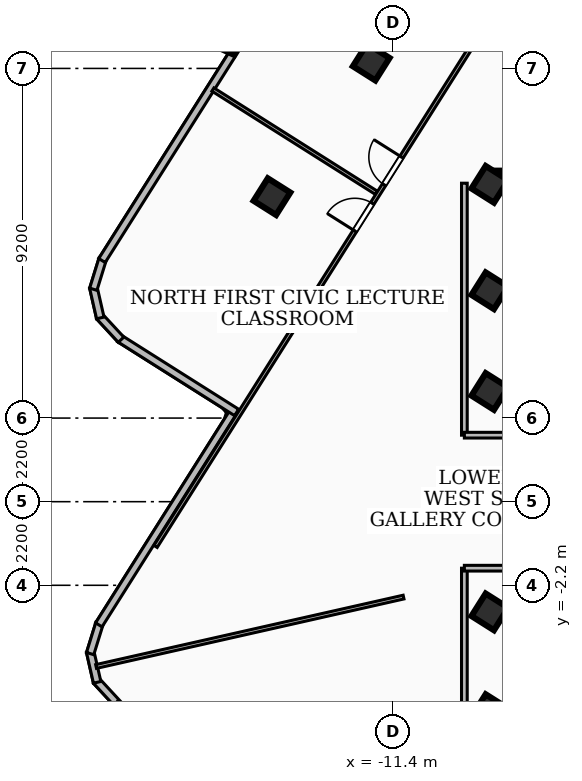
"""IFC4 building model, lengths in metres.
Left out: names, types, materials, properties, quantities, classifications, styles, units other than length and angle.
Written with IfcOpenShell. Run it as: python <this file> out.ifc"""

import sys

from ifc_helpers import new_model, si_unit, direction, frame, frame_2d, origin, origin_2d, place, context, subcontext, project, spatial, rectangle, extrude, element, fill, save


model = new_model("IFC4")
c1 = context("Model", 3, precision=1e-05, world=origin(), true_north=direction((0.0, 1.0)))
c2 = subcontext(c1, "Body", "Model", "MODEL_VIEW")
j1 = project(units=[si_unit("LENGTHUNIT", "METRE"), si_unit("PLANEANGLEUNIT", "RADIAN")], contexts=[c1])
p1 = place(None, origin())
s1 = spatial("IfcSite", under=j1, at=p1, CompositionType="ELEMENT")
p2 = place(p1, origin())
s2 = spatial("IfcBuilding", under=s1, at=p2, CompositionType="ELEMENT")
p3 = place(p2, frame((0.0, 0.0, 271.44)))
s3 = spatial("IfcBuildingStorey", under=s2, at=p3, CompositionType="ELEMENT", Elevation=271.44)
p4 = place(p3, frame((-8.78, 8.51, 0.0), z_axis=(0.0, 0.0, 1.0), x_axis=(1.0, 0.0, 0.0)))
e1 = element("IfcWall", 1, at=p4, inside=s3, PredefinedType="SHEAR", context=c2, shape_type="SweptSolid", body=[
    extrude(rectangle(XDim=17.56, YDim=0.4, at=frame_2d((8.78, 0.0))), origin(), (0.0, 0.0, 1.0), 3.16),
])
for number, where, z_axis, x_axis in (
    (2, (-8.85, -5.55, 0.0), (0.0, 0.0, 1.0), (0.534, 0.845, 0.0)),
    (3, (-8.85, -2.9, 0.0), (0.0, 0.0, 1.0), (0.534, 0.845, 0.0)),
    (4, (-8.85, 2.9, 0.0), (0.0, 0.0, 1.0), (0.534, 0.845, 0.0)),
    (5, (-8.85, 5.55, 0.0), (0.0, 0.0, 1.0), (0.534, 0.845, 0.0)),
    (6, (-8.85, 8.35, 0.0), (0.0, 0.0, 1.0), (0.534, 0.845, 0.0)),
    (7, (-11.971, 11.566, 0.0), (0.0, 0.0, 1.0), (0.534, 0.845, 0.0)),
    (8, (-14.583, 8.026, 0.0), (0.0, 0.0, 1.0), (0.534, 0.845, 0.0)),
):
    element("IfcColumn", number, at=place(p3, frame(where, z_axis=z_axis, x_axis=x_axis)), inside=s3, PredefinedType="COLUMN", context=c2, shape_type="SweptSolid", body=[
        extrude(rectangle(XDim=0.7, YDim=0.7, at=origin_2d()), origin(), (0.0, 0.0, 1.0), 3.42),
    ])
p5 = place(p3, frame((-18.638, -5.326, 0.0), z_axis=(0.0, 0.0, 1.0), x_axis=(-0.678558613405, 0.734546260064, 0.0)))
e9 = element("IfcWall", 9, at=p5, inside=s3, PredefinedType="SOLIDWALL", context=c2, shape_type="SweptSolid", body=[
    extrude(rectangle(XDim=0.837, YDim=0.2, at=frame_2d((0.418, 0.0))), origin(), (0.0, 0.0, 1.0), 3.16),
])
p6 = place(p3, frame((-19.183, -4.753, 0.0), z_axis=(0.0, 0.0, 1.0), x_axis=(-0.22178748126, 0.975095027757, 0.0)))
e10 = element("IfcWall", 10, at=p6, inside=s3, PredefinedType="SOLIDWALL", context=c2, shape_type="SweptSolid", body=[
    extrude(rectangle(XDim=0.824, YDim=0.2, at=frame_2d((0.412, 0.0))), origin(), (0.0, 0.0, 1.0), 3.16),
])
p7 = place(p3, frame((-19.367, -3.997, 0.0), z_axis=(0.0, 0.0, 1.0), x_axis=(0.295803919306, 0.955248680357, 0.0)))
e11 = element("IfcWall", 11, at=p7, inside=s3, PredefinedType="SOLIDWALL", context=c2, shape_type="SweptSolid", body=[
    extrude(rectangle(XDim=0.839, YDim=0.2, at=frame_2d((0.419, 0.0))), origin(), (0.0, 0.0, 1.0), 3.16),
])
p8 = place(p3, frame((-19.139, -3.241, 0.0), z_axis=(0.0, 0.0, 1.0), x_axis=(0.534084270085, 0.845431246435, 0.0)))
e12 = element("IfcWall", 12, at=p8, inside=s3, PredefinedType="SOLIDWALL", context=c2, shape_type="SweptSolid", body=[
    extrude(rectangle(XDim=6.742, YDim=0.2, at=frame_2d((3.371, 0.0))), origin(), (0.0, 0.0, 1.0), 3.16),
])
p9 = place(p3, frame((-15.513, 2.348, 0.0), z_axis=(0.0, 0.0, 1.0), x_axis=(-0.8454427056, 0.534066130313, 0.0)))
e13 = element("IfcWall", 13, at=p9, inside=s3, PredefinedType="SOLIDWALL", context=c2, shape_type="SweptSolid", body=[
    extrude(rectangle(XDim=3.642, YDim=0.2, at=frame_2d((1.821, 0.0))), origin(), (0.0, 0.0, 1.0), 3.16),
])
p10 = place(p3, frame((-18.554, 4.262, 0.0), z_axis=(0.0, 0.0, 1.0), x_axis=(-0.679187212508, 0.73396507435, 0.0)))
e14 = element("IfcWall", 14, at=p10, inside=s3, PredefinedType="SOLIDWALL", context=c2, shape_type="SweptSolid", body=[
    extrude(rectangle(XDim=0.838, YDim=0.2, at=frame_2d((0.419, 0.0))), origin(), (0.0, 0.0, 1.0), 3.16),
])
p11 = place(p3, frame((-19.1, 4.835, 0.0), z_axis=(0.0, 0.0, 1.0), x_axis=(-0.222043922605, 0.975036664149, 0.0)))
e15 = element("IfcWall", 15, at=p11, inside=s3, PredefinedType="SOLIDWALL", context=c2, shape_type="SweptSolid", body=[
    extrude(rectangle(XDim=0.823, YDim=0.2, at=frame_2d((0.412, 0.0))), origin(), (0.0, 0.0, 1.0), 3.16),
])
p12 = place(p3, frame((-19.284, 5.59, 0.0), z_axis=(0.0, 0.0, 1.0), x_axis=(0.295803919306, 0.955248680357, 0.0)))
e16 = element("IfcWall", 16, at=p12, inside=s3, PredefinedType="SOLIDWALL", context=c2, shape_type="SweptSolid", body=[
    extrude(rectangle(XDim=0.839, YDim=0.2, at=frame_2d((0.419, 0.0))), origin(), (0.0, 0.0, 1.0), 3.16),
])
p13 = place(p3, frame((-19.056, 6.346, 0.0), z_axis=(0.0, 0.0, 1.0), x_axis=(0.534060804588, 0.845446069837, 0.0)))
e17 = element("IfcWall", 17, at=p13, inside=s3, PredefinedType="SOLIDWALL", context=c2, shape_type="SweptSolid", body=[
    extrude(rectangle(XDim=10.023, YDim=0.2, at=frame_2d((5.012, 0.0))), origin(), (0.0, 0.0, 1.0), 3.16),
])
p14 = place(p13, frame((6.618, 0.0, 0.85)))
e18 = element("IfcOpeningElement", 18, at=p14, cuts=e17, PredefinedType="OPENING", context=c2, shape_type="SweptSolid", body=[
    extrude(rectangle(XDim=2.4, YDim=1.85, at=frame_2d((1.2, 0.925))), frame((0.0, 0.11, 0.0), z_axis=(0.0, -1.0, 0.0), x_axis=(1.0, 0.0, 0.0)), (0.0, 0.0, 1.0), 0.22),
])
p15 = place(p3, frame((-9.52, 1.75, 0.0), z_axis=(0.0, 0.0, 1.0), x_axis=(0.0, 1.0, 0.0)))
e19 = element("IfcWall", 19, at=p15, inside=s3, PredefinedType="PARTITIONING", context=c2, shape_type="SweptSolid", body=[
    extrude(rectangle(XDim=6.63, YDim=0.15, at=frame_2d((3.315, 0.0))), origin(), (0.0, 0.0, 1.0), 2.53),
])
p16 = place(p3, frame((-7.85, 1.75, 0.0), z_axis=(0.0, 0.0, 1.0), x_axis=(-1.0, 0.0, 0.0)))
e20 = element("IfcWall", 20, at=p16, inside=s3, PredefinedType="PARTITIONING", context=c2, shape_type="SweptSolid", body=[
    extrude(rectangle(XDim=1.67, YDim=0.15, at=frame_2d((0.835, 0.0))), origin(), (0.0, 0.0, 1.0), 2.39),
])
p17 = place(p3, frame((-9.52, -8.38, 0.0), z_axis=(0.0, 0.0, 1.0), x_axis=(0.0, 1.0, 0.0)))
e21 = element("IfcWall", 21, at=p17, inside=s3, PredefinedType="PARTITIONING", context=c2, shape_type="SweptSolid", body=[
    extrude(rectangle(XDim=6.63, YDim=0.15, at=frame_2d((3.315, 0.0))), origin(), (0.0, 0.0, 1.0), 3.16),
])
p18 = place(p3, frame((-7.85, -1.75, 0.0), z_axis=(0.0, 0.0, 1.0), x_axis=(-1.0, 0.0, 0.0)))
e22 = element("IfcWall", 22, at=p18, inside=s3, PredefinedType="PARTITIONING", context=c2, shape_type="SweptSolid", body=[
    extrude(rectangle(XDim=1.67, YDim=0.15, at=frame_2d((0.835, 0.0))), origin(), (0.0, 0.0, 1.0), 2.39),
])
p19 = place(p3, frame((-11.12, -2.51, 0.0), z_axis=(0.0, 0.0, 1.0), x_axis=(-0.975442430033, -0.220254547494, 0.0)))
e23 = element("IfcWall", 23, at=p19, inside=s3, PredefinedType="PARTITIONING", context=c2, shape_type="SweptSolid", body=[
    extrude(rectangle(XDim=8.294, YDim=0.1, at=frame_2d((4.147, 0.0))), origin(), (0.0, 0.0, 1.0), 3.16),
])
p20 = place(p3, frame((-11.838, 8.129, 0.0), z_axis=(0.0, 0.0, 1.0), x_axis=(-0.845412458252, 0.53411400977, 0.0)))
e24 = element("IfcWall", 24, at=p20, inside=s3, PredefinedType="PARTITIONING", context=c2, shape_type="SweptSolid", body=[
    extrude(rectangle(XDim=5.085, YDim=0.1, at=frame_2d((2.542, 0.0))), origin(), (0.0, 0.0, 1.0), 2.53),
])
p21 = place(p3, frame((-17.646, -1.178, 0.0), z_axis=(0.0, 0.0, 1.0), x_axis=(0.534052309352, 0.845451436143, 0.0)))
e25 = element("IfcWall", 25, at=p21, inside=s3, PredefinedType="PARTITIONING", context=c2, shape_type="SweptSolid", body=[
    extrude(rectangle(XDim=20.44, YDim=0.1, at=frame_2d((10.22, 0.0))), origin(), (0.0, 0.0, 1.0), 2.53),
])
p22 = place(p21, frame((11.259, 0.0, 0.0)))
e26 = element("IfcOpeningElement", 26, at=p22, cuts=e25, PredefinedType="OPENING", context=c2, shape_type="SweptSolid", body=[
    extrude(rectangle(XDim=0.86, YDim=2.04, at=frame_2d((0.43, 1.02))), frame((0.0, 0.06, 0.0), z_axis=(0.0, -1.0, 0.0), x_axis=(1.0, 0.0, 0.0)), (0.0, 0.0, 1.0), 0.12),
])
p23 = place(p21, frame((9.819, 0.0, 0.0)))
e27 = element("IfcOpeningElement", 27, at=p23, cuts=e25, PredefinedType="OPENING", context=c2, shape_type="SweptSolid", body=[
    extrude(rectangle(XDim=0.86, YDim=2.04, at=frame_2d((0.43, 1.02))), frame((0.0, 0.06, 0.0), z_axis=(0.0, -1.0, 0.0), x_axis=(1.0, 0.0, 0.0)), (0.0, 0.0, 1.0), 0.12),
])
p24 = place(p22, origin())
e28 = element("IfcDoor", 28, at=p24, inside=s3, OperationType="SINGLE_SWING_RIGHT", PredefinedType="DOOR", context=c2, shape_type="SweptSolid", body=[
    extrude(rectangle(XDim=0.86, YDim=2.04, at=frame_2d((0.43, 1.02))), frame((0.0, 0.025, 0.0), z_axis=(0.0, -1.0, 0.0), x_axis=(1.0, 0.0, 0.0)), (0.0, 0.0, 1.0), 0.05),
])
fill(e26, e28)
p25 = place(p23, origin())
e29 = element("IfcDoor", 29, at=p25, inside=s3, OperationType="SINGLE_SWING_LEFT", PredefinedType="DOOR", context=c2, shape_type="SweptSolid", body=[
    extrude(rectangle(XDim=0.86, YDim=2.04, at=frame_2d((0.43, 1.02))), frame((0.0, 0.025, 0.0), z_axis=(0.0, -1.0, 0.0), x_axis=(1.0, 0.0, 0.0)), (0.0, 0.0, 1.0), 0.05),
])
fill(e27, e29)
save(model, sys.argv[1])
